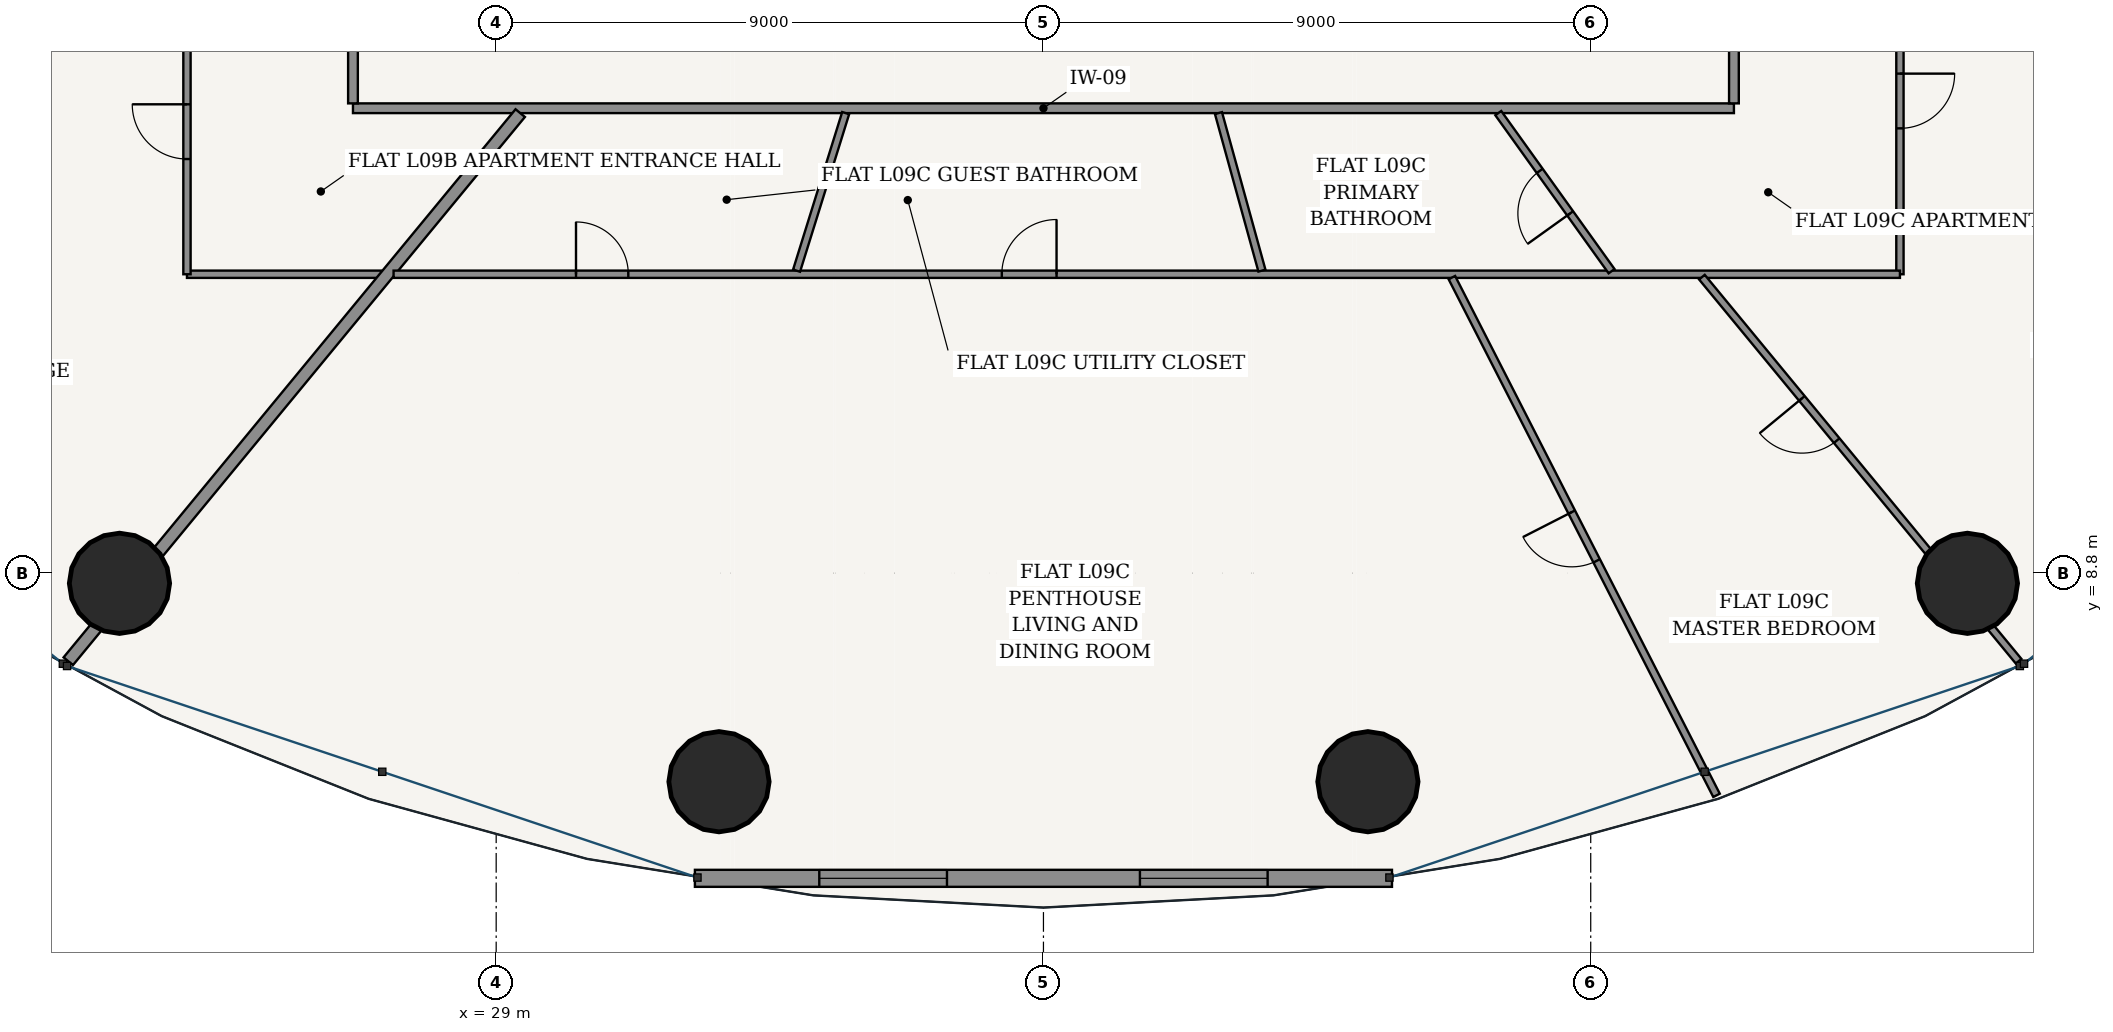
"""IFC4 building model, lengths in metres.
Left out: names, types, materials, properties, quantities, classifications, styles, units other than length and angle.
Written with IfcOpenShell. Run it as: python <this file> out.ifc"""

import sys

from ifc_helpers import new_model, si_unit, direction, frame, frame_2d, origin, origin_2d, place, context, subcontext, project, spatial, rectangle, hollow_circle, extrude, source, transform, mapped, element, fill, save


model = new_model("IFC4")
c1 = context("Model", 3, precision=1e-05, world=origin(), true_north=direction((-0.2419218956, 0.970295726276)))
c2 = subcontext(c1, "Body", "Model", "MODEL_VIEW")
j1 = project(units=[si_unit("LENGTHUNIT", "METRE"), si_unit("PLANEANGLEUNIT", "RADIAN")], contexts=[c1])
p1 = place(None, origin())
s1 = spatial("IfcSite", under=j1, at=p1, CompositionType="ELEMENT")
p2 = place(p1, origin())
s2 = spatial("IfcBuilding", under=s1, at=p2, CompositionType="ELEMENT")
p3 = place(p2, frame((0.0, 0.0, 38.4)))
s3 = spatial("IfcBuildingStorey", under=s2, at=p3, CompositionType="ELEMENT", Elevation=38.4)
for number, where, z_axis, x_axis in (
    (1, (22.805, 8.632, 0.0), (0.0, 0.0, 1.0), (1.0, 0.0, 0.0)),
    (2, (32.664, 5.37, 0.0), (0.0, 0.0, 1.0), (1.0, 0.0, 0.0)),
    (3, (43.336, 5.37, 0.0), (0.0, 0.0, 1.0), (1.0, 0.0, 0.0)),
    (4, (53.195, 8.632, 0.0), (0.0, 0.0, 1.0), (1.0, 0.0, 0.0)),
):
    element("IfcColumn", number, at=place(p3, frame(where, z_axis=z_axis, x_axis=x_axis)), inside=s3, PredefinedType="COLUMN", context=c2, shape_type="SweptSolid", body=[
        extrude(hollow_circle(Radius=0.825, WallThickness=0.05, at=origin_2d()), origin(), (0.0, 0.0, 1.0), 3.6),
    ])
p4 = place(p3, frame((32.268, 3.781, 0.0), z_axis=(0.0, 0.0, 1.0), x_axis=(1.0, 0.0, 0.0)))
e5 = element("IfcWall", 5, at=p4, inside=s3, PredefinedType="SOLIDWALL", context=c2, shape_type="SweptSolid", body=[
    extrude(rectangle(XDim=11.463, YDim=0.28, at=frame_2d((5.732, 0.0))), origin(), (0.0, 0.0, 1.0), 3.32),
])
p5 = place(p4, frame((2.045, 0.0, 0.85)))
e6 = element("IfcOpeningElement", 6, at=p5, cuts=e5, PredefinedType="OPENING", context=c2, shape_type="SweptSolid", body=[
    extrude(rectangle(XDim=2.1, YDim=1.95, at=frame_2d((1.05, 0.975))), frame((0.0, 0.15, 0.0), z_axis=(0.0, -1.0, 0.0), x_axis=(1.0, 0.0, 0.0)), (0.0, 0.0, 1.0), 0.3),
])
p6 = place(p4, frame((7.318, 0.0, 0.85)))
e7 = element("IfcOpeningElement", 7, at=p6, cuts=e5, PredefinedType="OPENING", context=c2, shape_type="SweptSolid", body=[
    extrude(rectangle(XDim=2.1, YDim=1.95, at=frame_2d((1.05, 0.975))), frame((0.0, 0.15, 0.0), z_axis=(0.0, -1.0, 0.0), x_axis=(1.0, 0.0, 0.0)), (0.0, 0.0, 1.0), 0.3),
])
p7 = place(p3, frame((26.645, 16.445, 0.0), z_axis=(0.0, 0.0, 1.0), x_axis=(1.0, 0.0, 0.0)))
e8 = element("IfcWall", 8, at=p7, inside=s3, PredefinedType="PARTITIONING", context=c2, shape_type="SweptSolid", body=[
    extrude(rectangle(XDim=22.71, YDim=0.16, at=frame_2d((11.355, 0.0))), origin(), (0.0, 0.0, 1.0), 2.688),
])
p8 = place(p3, frame((26.645, 16.525, 0.0), z_axis=(0.0, 0.0, 1.0), x_axis=(0.0, 1.0, 0.0)))
e9 = element("IfcWall", 9, at=p8, inside=s3, PredefinedType="PARTITIONING", context=c2, shape_type="SweptSolid", body=[
    extrude(rectangle(XDim=20.55, YDim=0.16, at=frame_2d((10.275, 0.0))), origin(), (0.0, 0.0, 1.0), 2.688),
])
p9 = place(p8, frame((1.226, 0.0, 0.0)))
e10 = element("IfcOpeningElement", 10, at=p9, cuts=e9, PredefinedType="OPENING", context=c2, shape_type="SweptSolid", body=[
    extrude(rectangle(XDim=0.98, YDim=2.2, at=frame_2d((0.49, 1.1))), frame((0.0, 0.09, 0.0), z_axis=(0.0, -1.0, 0.0), x_axis=(1.0, 0.0, 0.0)), (0.0, 0.0, 1.0), 0.18),
])
p10 = place(p3, frame((49.355, 16.525, 0.0), z_axis=(0.0, 0.0, 1.0), x_axis=(0.0, 1.0, 0.0)))
e11 = element("IfcWall", 11, at=p10, inside=s3, PredefinedType="PARTITIONING", context=c2, shape_type="SweptSolid", body=[
    extrude(rectangle(XDim=20.55, YDim=0.16, at=frame_2d((10.275, 0.0))), origin(), (0.0, 0.0, 1.0), 2.688),
])
p11 = place(p10, frame((17.207, 0.0, 0.0)))
e12 = element("IfcOpeningElement", 12, at=p11, cuts=e11, PredefinedType="OPENING", context=c2, shape_type="SweptSolid", body=[
    extrude(rectangle(XDim=0.98, YDim=2.2, at=frame_2d((0.49, 1.1))), frame((0.0, 0.09, 0.0), z_axis=(0.0, -1.0, 0.0), x_axis=(1.0, 0.0, 0.0)), (0.0, 0.0, 1.0), 0.18),
])
p12 = place(p10, frame((1.892, 0.0, 0.0)))
e13 = element("IfcOpeningElement", 13, at=p12, cuts=e11, PredefinedType="OPENING", context=c2, shape_type="SweptSolid", body=[
    extrude(rectangle(XDim=0.98, YDim=2.2, at=frame_2d((0.49, 1.1))), frame((0.0, 0.09, 0.0), z_axis=(0.0, -1.0, 0.0), x_axis=(1.0, 0.0, 0.0)), (0.0, 0.0, 1.0), 0.18),
])
p13 = place(p3, frame((27.109, 13.715, 0.0), z_axis=(0.0, 0.0, 1.0), x_axis=(-1.0, 0.0, 0.0)))
e14 = element("IfcWall", 14, at=p13, inside=s3, PredefinedType="PARTITIONING", context=c2, shape_type="SweptSolid", body=[
    extrude(rectangle(XDim=3.194, YDim=0.12, at=frame_2d((1.597, 0.0))), origin(), (0.0, 0.0, 1.0), 2.688),
])
p14 = place(p3, frame((23.915, 13.715, 0.0), z_axis=(0.0, 0.0, 1.0), x_axis=(0.0, 1.0, 0.0)))
e15 = element("IfcWall", 15, at=p14, inside=s3, PredefinedType="PARTITIONING", context=c2, shape_type="SweptSolid", body=[
    extrude(rectangle(XDim=26.17, YDim=0.12, at=frame_2d((13.085, 0.0))), origin(), (0.0, 0.0, 1.0), 2.688),
])
p15 = place(p14, frame((1.895, 0.0, 0.0)))
e16 = element("IfcOpeningElement", 16, at=p15, cuts=e15, PredefinedType="OPENING", context=c2, shape_type="SweptSolid", body=[
    extrude(rectangle(XDim=0.9, YDim=2.15, at=frame_2d((0.45, 1.075))), frame((0.0, 0.07, 0.0), z_axis=(0.0, -1.0, 0.0), x_axis=(1.0, 0.0, 0.0)), (0.0, 0.0, 1.0), 0.14),
])
p16 = place(p14, frame((11.498, 0.0, 0.0)))
e17 = element("IfcOpeningElement", 17, at=p16, cuts=e15, PredefinedType="OPENING", context=c2, shape_type="SweptSolid", body=[
    extrude(rectangle(XDim=0.9, YDim=2.15, at=frame_2d((0.45, 1.075))), frame((0.0, 0.07, 0.0), z_axis=(0.0, -1.0, 0.0), x_axis=(1.0, 0.0, 0.0)), (0.0, 0.0, 1.0), 0.14),
])
p17 = place(p14, frame((23.831, 0.0, 0.0)))
e18 = element("IfcOpeningElement", 18, at=p17, cuts=e15, PredefinedType="OPENING", context=c2, shape_type="SweptSolid", body=[
    extrude(rectangle(XDim=0.86, YDim=2.15, at=frame_2d((0.43, 1.075))), frame((0.0, 0.07, 0.0), z_axis=(0.0, -1.0, 0.0), x_axis=(1.0, 0.0, 0.0)), (0.0, 0.0, 1.0), 0.14),
])
p18 = place(p3, frame((23.861, 19.144, 0.0), z_axis=(0.0, 0.0, 1.0), x_axis=(-0.879372452045, -0.476134529922, 0.0)))
e19 = element("IfcWall", 19, at=p18, inside=s3, PredefinedType="PARTITIONING", context=c2, shape_type="SweptSolid", body=[
    extrude(rectangle(XDim=11.219, YDim=0.12, at=frame_2d((5.61, 0.0))), origin(), (0.0, 0.0, 1.0), 2.688),
])
p19 = place(p18, frame((4.097, 0.0, 0.0)))
e20 = element("IfcOpeningElement", 20, at=p19, cuts=e19, PredefinedType="OPENING", context=c2, shape_type="SweptSolid", body=[
    extrude(rectangle(XDim=0.9, YDim=2.15, at=frame_2d((0.45, 1.075))), frame((0.0, 0.07, 0.0), z_axis=(0.0, -1.0, 0.0), x_axis=(1.0, 0.0, 0.0)), (0.0, 0.0, 1.0), 0.14),
])
p20 = place(p3, frame((29.396, 16.365, 0.0), z_axis=(0.0, 0.0, 1.0), x_axis=(-0.636186165667, -0.771535587393, 0.0)))
e21 = element("IfcWall", 21, at=p20, inside=s3, PredefinedType="PARTITIONING", context=c2, shape_type="SweptSolid", body=[
    extrude(rectangle(XDim=11.683, YDim=0.2, at=frame_2d((5.842, 0.0))), origin(), (0.0, 0.0, 1.0), 2.688),
])
p21 = place(p3, frame((52.085, 28.968, 0.0), z_axis=(0.0, 0.0, 1.0), x_axis=(0.0, -1.0, 0.0)))
e22 = element("IfcWall", 22, at=p21, inside=s3, PredefinedType="PARTITIONING", context=c2, shape_type="SweptSolid", body=[
    extrude(rectangle(XDim=15.253, YDim=0.12, at=frame_2d((7.626, 0.0))), origin(), (0.0, 0.0, 1.0), 2.688),
])
p22 = place(p21, frame((11.954, 0.0, 0.0)))
e23 = element("IfcOpeningElement", 23, at=p22, cuts=e22, PredefinedType="OPENING", context=c2, shape_type="SweptSolid", body=[
    extrude(rectangle(XDim=0.9, YDim=2.15, at=frame_2d((0.45, 1.075))), frame((0.0, 0.07, 0.0), z_axis=(0.0, -1.0, 0.0), x_axis=(1.0, 0.0, 0.0)), (0.0, 0.0, 1.0), 0.14),
])
p23 = place(p21, frame((5.182, 0.0, 0.0)))
e24 = element("IfcOpeningElement", 24, at=p23, cuts=e22, PredefinedType="OPENING", context=c2, shape_type="SweptSolid", body=[
    extrude(rectangle(XDim=0.9, YDim=2.15, at=frame_2d((0.45, 1.075))), frame((0.0, 0.07, 0.0), z_axis=(0.0, -1.0, 0.0), x_axis=(1.0, 0.0, 0.0)), (0.0, 0.0, 1.0), 0.14),
])
p24 = place(p21, frame((1.889, 0.0, 0.0)))
e25 = element("IfcOpeningElement", 25, at=p24, cuts=e22, PredefinedType="OPENING", context=c2, shape_type="SweptSolid", body=[
    extrude(rectangle(XDim=0.9, YDim=2.15, at=frame_2d((0.45, 1.075))), frame((0.0, 0.07, 0.0), z_axis=(0.0, -1.0, 0.0), x_axis=(1.0, 0.0, 0.0)), (0.0, 0.0, 1.0), 0.14),
])
p25 = place(p3, frame((52.085, 13.715, 0.0), z_axis=(0.0, 0.0, 1.0), x_axis=(-1.0, 0.0, 0.0)))
e26 = element("IfcWall", 26, at=p25, inside=s3, PredefinedType="PARTITIONING", context=c2, shape_type="SweptSolid", body=[
    extrude(rectangle(XDim=24.772, YDim=0.12, at=frame_2d((12.386, 0.0))), origin(), (0.0, 0.0, 1.0), 2.688),
])
p26 = place(p25, frame((20.912, 0.0, 0.0)))
e27 = element("IfcOpeningElement", 27, at=p26, cuts=e26, PredefinedType="OPENING", context=c2, shape_type="SweptSolid", body=[
    extrude(rectangle(XDim=0.86, YDim=2.15, at=frame_2d((0.43, 1.075))), frame((0.0, 0.07, 0.0), z_axis=(0.0, -1.0, 0.0), x_axis=(1.0, 0.0, 0.0)), (0.0, 0.0, 1.0), 0.14),
])
p27 = place(p25, frame((13.87, 0.0, 0.0)))
e28 = element("IfcOpeningElement", 28, at=p27, cuts=e26, PredefinedType="OPENING", context=c2, shape_type="SweptSolid", body=[
    extrude(rectangle(XDim=0.9, YDim=2.15, at=frame_2d((0.45, 1.075))), frame((0.0, 0.07, 0.0), z_axis=(0.0, -1.0, 0.0), x_axis=(1.0, 0.0, 0.0)), (0.0, 0.0, 1.0), 0.14),
])
p28 = place(p3, frame((44.717, 13.66, 0.0), z_axis=(0.0, 0.0, 1.0), x_axis=(0.455131303234, -0.890424335256, 0.0)))
e29 = element("IfcWall", 29, at=p28, inside=s3, PredefinedType="PARTITIONING", context=c2, shape_type="SweptSolid", body=[
    extrude(rectangle(XDim=9.562, YDim=0.12, at=frame_2d((4.781, 0.0))), origin(), (0.0, 0.0, 1.0), 2.762),
])
p29 = place(p28, frame((4.331, 0.0, 0.0)))
e30 = element("IfcOpeningElement", 30, at=p29, cuts=e29, PredefinedType="OPENING", context=c2, shape_type="SweptSolid", body=[
    extrude(rectangle(XDim=0.9, YDim=2.15, at=frame_2d((0.45, 1.075))), frame((0.0, 0.07, 0.0), z_axis=(0.0, -1.0, 0.0), x_axis=(1.0, 0.0, 0.0)), (0.0, 0.0, 1.0), 0.14),
])
p30 = place(p3, frame((48.829, 13.667, 0.0), z_axis=(0.0, 0.0, 1.0), x_axis=(0.636177533893, -0.771542704826, 0.0)))
e31 = element("IfcWall", 31, at=p30, inside=s3, PredefinedType="PARTITIONING", context=c2, shape_type="SweptSolid", body=[
    extrude(rectangle(XDim=8.187, YDim=0.12, at=frame_2d((4.093, 0.0))), origin(), (0.0, 0.0, 1.0), 2.688),
])
p31 = place(p30, frame((2.584, 0.0, 0.0)))
e32 = element("IfcOpeningElement", 32, at=p31, cuts=e31, PredefinedType="OPENING", context=c2, shape_type="SweptSolid", body=[
    extrude(rectangle(XDim=0.9, YDim=2.15, at=frame_2d((0.45, 1.075))), frame((0.0, 0.07, 0.0), z_axis=(0.0, -1.0, 0.0), x_axis=(1.0, 0.0, 0.0)), (0.0, 0.0, 1.0), 0.14),
])
p32 = place(p3, frame((52.139, 19.144, 0.0), z_axis=(0.0, 0.0, 1.0), x_axis=(0.879372452045, -0.476134529922, 0.0)))
e33 = element("IfcWall", 33, at=p32, inside=s3, PredefinedType="PARTITIONING", context=c2, shape_type="SweptSolid", body=[
    extrude(rectangle(XDim=11.219, YDim=0.12, at=frame_2d((5.61, 0.0))), origin(), (0.0, 0.0, 1.0), 2.688),
])
p33 = place(p3, frame((34.748, 16.365, 0.0), z_axis=(0.0, 0.0, 1.0), x_axis=(-0.297598752493, -0.954691040345, 0.0)))
e34 = element("IfcWall", 34, at=p33, inside=s3, PredefinedType="PARTITIONING", context=c2, shape_type="SweptSolid", body=[
    extrude(rectangle(XDim=2.714, YDim=0.12, at=frame_2d((1.357, 0.0))), origin(), (0.0, 0.0, 1.0), 3.32),
])
p34 = place(p3, frame((40.878, 16.365, 0.0), z_axis=(0.0, 0.0, 1.0), x_axis=(0.265853298244, -0.964013497734, 0.0)))
e35 = element("IfcWall", 35, at=p34, inside=s3, PredefinedType="PARTITIONING", context=c2, shape_type="SweptSolid", body=[
    extrude(rectangle(XDim=2.687, YDim=0.12, at=frame_2d((1.344, 0.0))), origin(), (0.0, 0.0, 1.0), 3.32),
])
p35 = place(p3, frame((45.48, 16.365, 0.0), z_axis=(0.0, 0.0, 1.0), x_axis=(0.582566008831, -0.812783393872, 0.0)))
e36 = element("IfcWall", 36, at=p35, inside=s3, PredefinedType="PARTITIONING", context=c2, shape_type="SweptSolid", body=[
    extrude(rectangle(XDim=3.198, YDim=0.12, at=frame_2d((1.599, 0.0))), origin(), (0.0, 0.0, 1.0), 3.32),
])
p36 = place(p35, frame((1.169, 0.0, 0.0)))
e37 = element("IfcOpeningElement", 37, at=p36, cuts=e36, PredefinedType="OPENING", context=c2, shape_type="SweptSolid", body=[
    extrude(rectangle(XDim=0.86, YDim=2.15, at=frame_2d((0.43, 1.075))), frame((0.0, 0.07, 0.0), z_axis=(0.0, -1.0, 0.0), x_axis=(1.0, 0.0, 0.0)), (0.0, 0.0, 1.0), 0.14),
])
m1 = source(origin(), c2, "Body", "SweptSolid", [
    extrude(rectangle(XDim=2.1, YDim=1.95, at=frame_2d((1.05, 0.975))), frame((0.0, 0.03, 0.0), z_axis=(0.0, -1.0, 0.0), x_axis=(1.0, 0.0, 0.0)), (0.0, 0.0, 1.0), 0.06),
])
p37 = place(p5, origin())
e38 = element("IfcWindow", 38, at=p37, inside=s3, PartitioningType="SINGLE_PANEL", PredefinedType="WINDOW", context=c2, shape_type="MappedRepresentation", body=[
    mapped(m1, transform((0.0, 0.0, 0.0), scale=1.0)),
])
fill(e6, e38)
p38 = place(p6, origin())
e39 = element("IfcWindow", 39, at=p38, inside=s3, PartitioningType="SINGLE_PANEL", PredefinedType="WINDOW", context=c2, shape_type="MappedRepresentation", body=[
    mapped(m1, transform((0.0, 0.0, 0.0), scale=1.0)),
])
fill(e7, e39)
m2 = source(origin(), c2, "Body", "SweptSolid", [
    extrude(rectangle(XDim=0.9, YDim=2.15, at=frame_2d((0.45, 1.075))), frame((0.0, 0.025, 0.0), z_axis=(0.0, -1.0, 0.0), x_axis=(1.0, 0.0, 0.0)), (0.0, 0.0, 1.0), 0.05),
])
p39 = place(p15, origin())
e40 = element("IfcDoor", 40, at=p39, inside=s3, OperationType="SINGLE_SWING_RIGHT", PredefinedType="DOOR", context=c2, shape_type="MappedRepresentation", body=[
    mapped(m2, transform((0.0, 0.0, 0.0), scale=1.0)),
])
fill(e16, e40)
m3 = source(origin(), c2, "Body", "SweptSolid", [
    extrude(rectangle(XDim=0.86, YDim=2.15, at=frame_2d((0.43, 1.075))), frame((0.0, 0.025, 0.0), z_axis=(0.0, -1.0, 0.0), x_axis=(1.0, 0.0, 0.0)), (0.0, 0.0, 1.0), 0.05),
])
p40 = place(p36, frame((0.86, 0.0, 0.0), z_axis=(0.0, 0.0, 1.0), x_axis=(-1.0, 0.0, 0.0)))
e41 = element("IfcDoor", 41, at=p40, inside=s3, OperationType="SINGLE_SWING_LEFT", PredefinedType="DOOR", context=c2, shape_type="MappedRepresentation", body=[
    mapped(m3, transform((0.0, 0.0, 0.0), scale=1.0)),
])
fill(e37, e41)
p41 = place(p22, origin())
e42 = element("IfcDoor", 42, at=p41, inside=s3, OperationType="SINGLE_SWING_LEFT", PredefinedType="DOOR", context=c2, shape_type="MappedRepresentation", body=[
    mapped(m2, transform((0.0, 0.0, 0.0), scale=1.0)),
])
fill(e23, e42)
p42 = place(p31, frame((0.9, 0.0, 0.0), z_axis=(0.0, 0.0, 1.0), x_axis=(-1.0, 0.0, 0.0)))
e43 = element("IfcDoor", 43, at=p42, inside=s3, OperationType="SINGLE_SWING_RIGHT", PredefinedType="DOOR", context=c2, shape_type="MappedRepresentation", body=[
    mapped(m2, transform((0.0, 0.0, 0.0), scale=1.0)),
])
fill(e32, e43)
p43 = place(p29, frame((0.9, 0.0, 0.0), z_axis=(0.0, 0.0, 1.0), x_axis=(-1.0, 0.0, 0.0)))
e44 = element("IfcDoor", 44, at=p43, inside=s3, OperationType="SINGLE_SWING_RIGHT", PredefinedType="DOOR", context=c2, shape_type="MappedRepresentation", body=[
    mapped(m2, transform((0.0, 0.0, 0.0), scale=1.0)),
])
fill(e30, e44)
p44 = place(p26, frame((0.86, 0.0, 0.0), z_axis=(0.0, 0.0, 1.0), x_axis=(-1.0, 0.0, 0.0)))
e45 = element("IfcDoor", 45, at=p44, inside=s3, OperationType="SINGLE_SWING_LEFT", PredefinedType="DOOR", context=c2, shape_type="MappedRepresentation", body=[
    mapped(m3, transform((0.0, 0.0, 0.0), scale=1.0)),
])
fill(e27, e45)
p45 = place(p27, frame((0.9, 0.0, 0.0), z_axis=(0.0, 0.0, 1.0), x_axis=(-1.0, 0.0, 0.0)))
e46 = element("IfcDoor", 46, at=p45, inside=s3, OperationType="SINGLE_SWING_RIGHT", PredefinedType="DOOR", context=c2, shape_type="MappedRepresentation", body=[
    mapped(m2, transform((0.0, 0.0, 0.0), scale=1.0)),
])
fill(e28, e46)
save(model, sys.argv[1])
